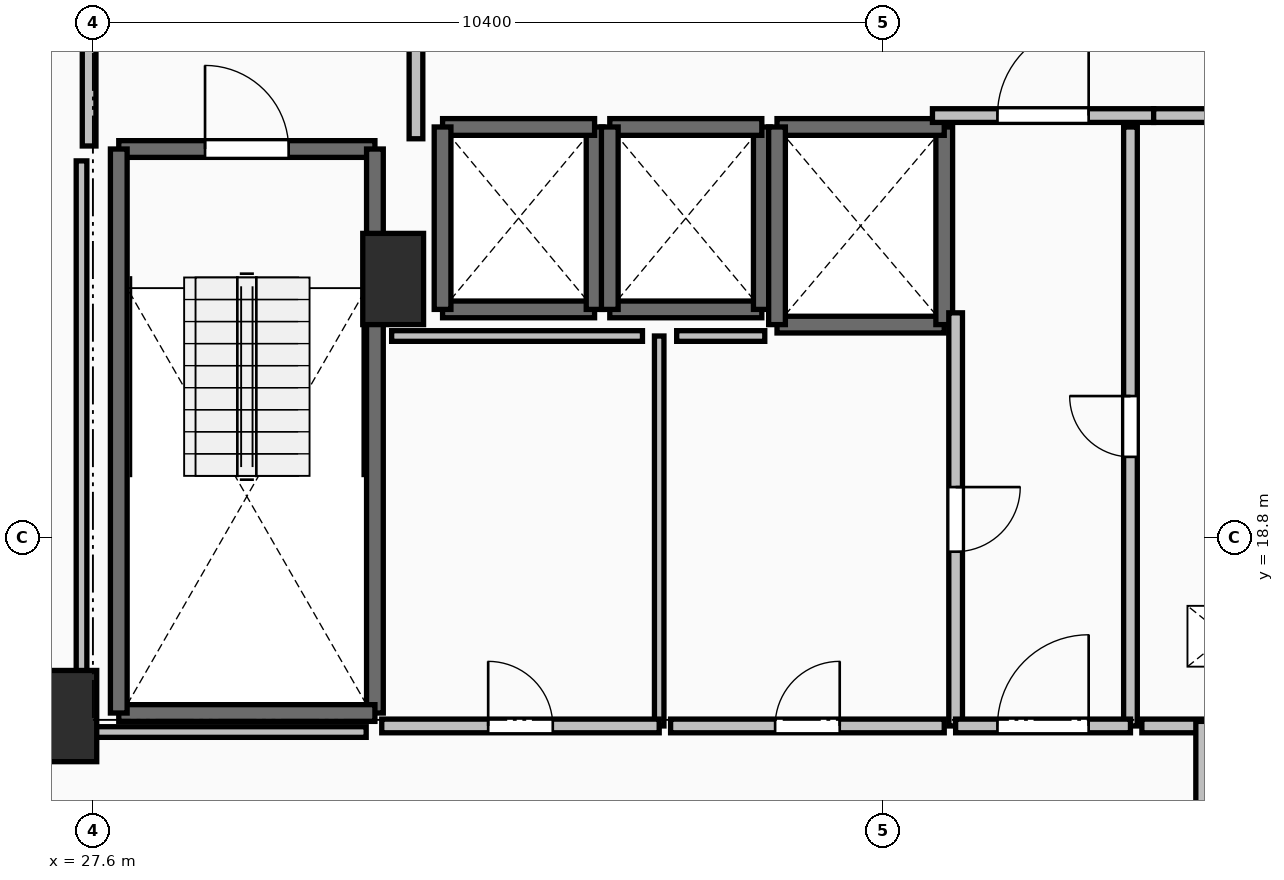
"""IFC4 building model, lengths in metres.
Left out: names, types, materials, properties, quantities, classifications, styles, units other than length and angle.
Written with IfcOpenShell. Run it as: python <this file> out.ifc"""

import sys

from ifc_helpers import new_model, si_unit, direction, frame, frame_2d, origin, origin_2d, place, context, subcontext, project, spatial, rectangle, extrude, element, fill, save


model = new_model("IFC4")
c1 = context("Model", 3, precision=1e-05, world=origin(), true_north=direction((0.0, 1.0)))
c2 = subcontext(c1, "Body", "Model", "MODEL_VIEW")
j1 = project(units=[si_unit("LENGTHUNIT", "METRE"), si_unit("PLANEANGLEUNIT", "RADIAN")], contexts=[c1])
p1 = place(None, origin())
s1 = spatial("IfcSite", under=j1, at=p1, CompositionType="ELEMENT")
p2 = place(p1, origin())
s2 = spatial("IfcBuilding", under=s1, at=p2, CompositionType="ELEMENT")
p3 = place(p2, frame((0.0, 0.0, 89.3)))
s3 = spatial("IfcBuildingStorey", under=s2, at=p3, CompositionType="ELEMENT", Elevation=89.3)
for number, where, z_axis, x_axis in (
    (1, (27.25, 16.45, 0.0), (0.0, 0.0, 1.0), (1.0, 0.0, 0.0)),
    (2, (31.55, 22.2, 0.0), (0.0, 0.0, 1.0), (1.0, 0.0, 0.0)),
):
    element("IfcColumn", number, at=place(p3, frame(where, z_axis=z_axis, x_axis=x_axis)), inside=s3, PredefinedType="PILASTER", context=c2, shape_type="SweptSolid", body=[
        extrude(rectangle(XDim=0.8, YDim=1.2, at=origin_2d()), origin(), (0.0, 0.0, 1.0), 3.5),
    ])
p4 = place(p3, frame((27.94, 23.91, 0.0), z_axis=(0.0, 0.0, 1.0), x_axis=(1.0, 0.0, 0.0)))
e3 = element("IfcWall", 3, at=p4, inside=s3, PredefinedType="SOLIDWALL", context=c2, shape_type="SweptSolid", body=[
    extrude(rectangle(XDim=3.37, YDim=0.22, at=frame_2d((1.685, 0.0))), origin(), (0.0, 0.0, 1.0), 3.24),
])
p5 = place(p4, frame((1.135, 0.0, 0.0)))
e4 = element("IfcOpeningElement", 4, at=p5, cuts=e3, PredefinedType="OPENING", context=c2, shape_type="SweptSolid", body=[
    extrude(rectangle(XDim=1.1, YDim=2.15, at=frame_2d((0.55, 1.075))), frame((0.0, 0.125, 0.0), z_axis=(0.0, -1.0, 0.0), x_axis=(1.0, 0.0, 0.0)), (0.0, 0.0, 1.0), 0.25),
])
p6 = place(p3, frame((31.31, 23.91, 0.0), z_axis=(0.0, 0.0, 1.0), x_axis=(0.0, -1.0, 0.0)))
e5 = element("IfcWall", 5, at=p6, inside=s3, PredefinedType="SOLIDWALL", context=c2, shape_type="SweptSolid", body=[
    extrude(rectangle(XDim=7.42, YDim=0.22, at=frame_2d((3.71, 0.0))), origin(), (0.0, 0.0, 1.0), 3.24),
])
p7 = place(p3, frame((31.31, 16.49, 0.0), z_axis=(0.0, 0.0, 1.0), x_axis=(-1.0, 0.0, 0.0)))
e6 = element("IfcWall", 6, at=p7, inside=s3, PredefinedType="SOLIDWALL", context=c2, shape_type="SweptSolid", body=[
    extrude(rectangle(XDim=3.37, YDim=0.22, at=frame_2d((1.685, 0.0))), origin(), (0.0, 0.0, 1.0), 3.24),
])
p8 = place(p3, frame((27.94, 16.49, 0.0), z_axis=(0.0, 0.0, 1.0), x_axis=(0.0, 1.0, 0.0)))
e7 = element("IfcWall", 7, at=p8, inside=s3, PredefinedType="SOLIDWALL", context=c2, shape_type="SweptSolid", body=[
    extrude(rectangle(XDim=7.42, YDim=0.22, at=frame_2d((3.71, 0.0))), origin(), (0.0, 0.0, 1.0), 3.24),
])
p9 = place(p3, frame((32.2, 21.8, 0.0), z_axis=(0.0, 0.0, 1.0), x_axis=(1.0, 0.0, 0.0)))
e8 = element("IfcWall", 8, at=p9, inside=s3, PredefinedType="SOLIDWALL", context=c2, shape_type="SweptSolid", body=[
    extrude(rectangle(XDim=2.0, YDim=0.22, at=frame_2d((1.0, 0.0))), origin(), (0.0, 0.0, 1.0), 3.24),
])
p10 = place(p3, frame((34.2, 21.8, 0.0), z_axis=(0.0, 0.0, 1.0), x_axis=(0.0, 1.0, 0.0)))
e9 = element("IfcWall", 9, at=p10, inside=s3, PredefinedType="SOLIDWALL", context=c2, shape_type="SweptSolid", body=[
    extrude(rectangle(XDim=2.4, YDim=0.22, at=frame_2d((1.2, 0.0))), origin(), (0.0, 0.0, 1.0), 3.24),
])
p11 = place(p3, frame((34.2, 24.2, 0.0), z_axis=(0.0, 0.0, 1.0), x_axis=(-1.0, 0.0, 0.0)))
e10 = element("IfcWall", 10, at=p11, inside=s3, PredefinedType="SOLIDWALL", context=c2, shape_type="SweptSolid", body=[
    extrude(rectangle(XDim=2.0, YDim=0.22, at=frame_2d((1.0, 0.0))), origin(), (0.0, 0.0, 1.0), 3.24),
])
p12 = place(p3, frame((32.2, 24.2, 0.0), z_axis=(0.0, 0.0, 1.0), x_axis=(0.0, -1.0, 0.0)))
e11 = element("IfcWall", 11, at=p12, inside=s3, PredefinedType="SOLIDWALL", context=c2, shape_type="SweptSolid", body=[
    extrude(rectangle(XDim=2.4, YDim=0.22, at=frame_2d((1.2, 0.0))), origin(), (0.0, 0.0, 1.0), 3.24),
])
p13 = place(p3, frame((34.4, 21.8, 0.0), z_axis=(0.0, 0.0, 1.0), x_axis=(1.0, 0.0, 0.0)))
e12 = element("IfcWall", 12, at=p13, inside=s3, PredefinedType="SOLIDWALL", context=c2, shape_type="SweptSolid", body=[
    extrude(rectangle(XDim=2.0, YDim=0.22, at=frame_2d((1.0, 0.0))), origin(), (0.0, 0.0, 1.0), 3.24),
])
p14 = place(p3, frame((36.4, 21.8, 0.0), z_axis=(0.0, 0.0, 1.0), x_axis=(0.0, 1.0, 0.0)))
e13 = element("IfcWall", 13, at=p14, inside=s3, PredefinedType="SOLIDWALL", context=c2, shape_type="SweptSolid", body=[
    extrude(rectangle(XDim=2.4, YDim=0.22, at=frame_2d((1.2, 0.0))), origin(), (0.0, 0.0, 1.0), 3.24),
])
p15 = place(p3, frame((36.4, 24.2, 0.0), z_axis=(0.0, 0.0, 1.0), x_axis=(-1.0, 0.0, 0.0)))
e14 = element("IfcWall", 14, at=p15, inside=s3, PredefinedType="SOLIDWALL", context=c2, shape_type="SweptSolid", body=[
    extrude(rectangle(XDim=2.0, YDim=0.22, at=frame_2d((1.0, 0.0))), origin(), (0.0, 0.0, 1.0), 3.24),
])
p16 = place(p3, frame((34.4, 24.2, 0.0), z_axis=(0.0, 0.0, 1.0), x_axis=(0.0, -1.0, 0.0)))
e15 = element("IfcWall", 15, at=p16, inside=s3, PredefinedType="SOLIDWALL", context=c2, shape_type="SweptSolid", body=[
    extrude(rectangle(XDim=2.4, YDim=0.22, at=frame_2d((1.2, 0.0))), origin(), (0.0, 0.0, 1.0), 3.24),
])
p17 = place(p3, frame((36.6, 21.6, 0.0), z_axis=(0.0, 0.0, 1.0), x_axis=(1.0, 0.0, 0.0)))
e16 = element("IfcWall", 16, at=p17, inside=s3, PredefinedType="SOLIDWALL", context=c2, shape_type="SweptSolid", body=[
    extrude(rectangle(XDim=2.2, YDim=0.22, at=frame_2d((1.1, 0.0))), origin(), (0.0, 0.0, 1.0), 3.24),
])
p18 = place(p3, frame((38.8, 21.6, 0.0), z_axis=(0.0, 0.0, 1.0), x_axis=(0.0, 1.0, 0.0)))
e17 = element("IfcWall", 17, at=p18, inside=s3, PredefinedType="SOLIDWALL", context=c2, shape_type="SweptSolid", body=[
    extrude(rectangle(XDim=2.6, YDim=0.22, at=frame_2d((1.3, 0.0))), origin(), (0.0, 0.0, 1.0), 3.24),
])
p19 = place(p3, frame((38.8, 24.2, 0.0), z_axis=(0.0, 0.0, 1.0), x_axis=(-1.0, 0.0, 0.0)))
e18 = element("IfcWall", 18, at=p19, inside=s3, PredefinedType="SOLIDWALL", context=c2, shape_type="SweptSolid", body=[
    extrude(rectangle(XDim=2.2, YDim=0.22, at=frame_2d((1.1, 0.0))), origin(), (0.0, 0.0, 1.0), 3.24),
])
p20 = place(p3, frame((36.6, 24.2, 0.0), z_axis=(0.0, 0.0, 1.0), x_axis=(0.0, -1.0, 0.0)))
e19 = element("IfcWall", 19, at=p20, inside=s3, PredefinedType="SOLIDWALL", context=c2, shape_type="SweptSolid", body=[
    extrude(rectangle(XDim=2.6, YDim=0.22, at=frame_2d((1.3, 0.0))), origin(), (0.0, 0.0, 1.0), 3.24),
])
p21 = place(p3, frame((31.85, 24.045, 0.0), z_axis=(0.0, 0.0, 1.0), x_axis=(0.0, 1.0, 0.0)))
e20 = element("IfcWall", 20, at=p21, inside=s3, PredefinedType="PARTITIONING", context=c2, shape_type="SweptSolid", body=[
    extrude(rectangle(XDim=3.91, YDim=0.18, at=frame_2d((1.955, 0.0))), origin(), (0.0, 0.0, 1.0), 3.24),
])
p22 = place(p21, frame((1.355, 0.0, 0.0)))
e21 = element("IfcOpeningElement", 21, at=p22, cuts=e20, PredefinedType="OPENING", context=c2, shape_type="SweptSolid", body=[
    extrude(rectangle(XDim=1.2, YDim=2.15, at=frame_2d((0.6, 1.075))), frame((0.0, 0.105, 0.0), z_axis=(0.0, -1.0, 0.0), x_axis=(1.0, 0.0, 0.0)), (0.0, 0.0, 1.0), 0.21),
])
p23 = place(p3, frame((27.55, 28.0, 0.0), z_axis=(0.0, 0.0, 1.0), x_axis=(0.0, -1.0, 0.0)))
e22 = element("IfcWall", 22, at=p23, inside=s3, PredefinedType="PARTITIONING", context=c2, shape_type="SweptSolid", body=[
    extrude(rectangle(XDim=4.05, YDim=0.18, at=frame_2d((2.025, 0.0))), origin(), (0.0, 0.0, 1.0), 3.24),
])
p24 = place(p23, frame((1.425, 0.0, 0.0)))
e23 = element("IfcOpeningElement", 23, at=p24, cuts=e22, PredefinedType="OPENING", context=c2, shape_type="SweptSolid", body=[
    extrude(rectangle(XDim=1.2, YDim=2.15, at=frame_2d((0.6, 1.075))), frame((0.0, 0.105, 0.0), z_axis=(0.0, -1.0, 0.0), x_axis=(1.0, 0.0, 0.0)), (0.0, 0.0, 1.0), 0.21),
])
p25 = place(p3, frame((38.645, 24.35, 0.0), z_axis=(0.0, 0.0, 1.0), x_axis=(1.0, 0.0, 0.0)))
e24 = element("IfcWall", 24, at=p25, inside=s3, PredefinedType="PARTITIONING", context=c2, shape_type="SweptSolid", body=[
    extrude(rectangle(XDim=2.91, YDim=0.18, at=frame_2d((1.455, 0.0))), origin(), (0.0, 0.0, 1.0), 3.24),
])
p26 = place(p25, frame((0.855, 0.0, 0.0)))
e25 = element("IfcOpeningElement", 25, at=p26, cuts=e24, PredefinedType="OPENING", context=c2, shape_type="SweptSolid", body=[
    extrude(rectangle(XDim=1.2, YDim=2.15, at=frame_2d((0.6, 1.075))), frame((0.0, 0.105, 0.0), z_axis=(0.0, -1.0, 0.0), x_axis=(1.0, 0.0, 0.0)), (0.0, 0.0, 1.0), 0.21),
])
p27 = place(p3, frame((41.555, 24.35, 0.0), z_axis=(0.0, 0.0, 1.0), x_axis=(1.0, 0.0, 0.0)))
e26 = element("IfcWall", 26, at=p27, inside=s3, PredefinedType="PARTITIONING", context=c2, shape_type="SweptSolid", body=[
    extrude(rectangle(XDim=2.445, YDim=0.18, at=frame_2d((1.223, 0.0))), origin(), (0.0, 0.0, 1.0), 3.24),
])
p28 = place(p27, frame((0.823, 0.0, 0.0)))
e27 = element("IfcOpeningElement", 27, at=p28, cuts=e26, PredefinedType="OPENING", context=c2, shape_type="SweptSolid", body=[
    extrude(rectangle(XDim=0.8, YDim=2.05, at=frame_2d((0.4, 1.025))), frame((0.0, 0.105, 0.0), z_axis=(0.0, -1.0, 0.0), x_axis=(1.0, 0.0, 0.0)), (0.0, 0.0, 1.0), 0.21),
])
p29 = place(p3, frame((41.25, 16.32, 0.0), z_axis=(0.0, 0.0, 1.0), x_axis=(0.0, 1.0, 0.0)))
e28 = element("IfcWall", 28, at=p29, inside=s3, PredefinedType="PARTITIONING", context=c2, shape_type="SweptSolid", body=[
    extrude(rectangle(XDim=7.88, YDim=0.18, at=frame_2d((3.94, 0.0))), origin(), (0.0, 0.0, 1.0), 3.24),
])
p30 = place(p29, frame((3.54, 0.0, 0.0)))
e29 = element("IfcOpeningElement", 29, at=p30, cuts=e28, PredefinedType="OPENING", context=c2, shape_type="SweptSolid", body=[
    extrude(rectangle(XDim=0.8, YDim=2.05, at=frame_2d((0.4, 1.025))), frame((0.0, 0.105, 0.0), z_axis=(0.0, -1.0, 0.0), x_axis=(1.0, 0.0, 0.0)), (0.0, 0.0, 1.0), 0.21),
])
p31 = place(p3, frame((38.95, 21.755, 0.0), z_axis=(0.0, 0.0, 1.0), x_axis=(0.0, -1.0, 0.0)))
e30 = element("IfcWall", 30, at=p31, inside=s3, PredefinedType="PARTITIONING", context=c2, shape_type="SweptSolid", body=[
    extrude(rectangle(XDim=5.435, YDim=0.18, at=frame_2d((2.717, 0.0))), origin(), (0.0, 0.0, 1.0), 3.24),
])
p32 = place(p31, frame((2.292, 0.0, 0.0)))
e31 = element("IfcOpeningElement", 31, at=p32, cuts=e30, PredefinedType="OPENING", context=c2, shape_type="SweptSolid", body=[
    extrude(rectangle(XDim=0.85, YDim=2.1, at=frame_2d((0.425, 1.05))), frame((0.0, 0.105, 0.0), z_axis=(0.0, -1.0, 0.0), x_axis=(1.0, 0.0, 0.0)), (0.0, 0.0, 1.0), 0.21),
])
p33 = place(p3, frame((38.95, 16.32, 0.0), z_axis=(0.0, 0.0, 1.0), x_axis=(1.0, 0.0, 0.0)))
e32 = element("IfcWall", 32, at=p33, inside=s3, PredefinedType="PARTITIONING", context=c2, shape_type="SweptSolid", body=[
    extrude(rectangle(XDim=2.3, YDim=0.18, at=frame_2d((1.15, 0.0))), origin(), (0.0, 0.0, 1.0), 3.24),
])
p34 = place(p33, frame((0.55, 0.0, 0.0)))
e33 = element("IfcOpeningElement", 33, at=p34, cuts=e32, PredefinedType="OPENING", context=c2, shape_type="SweptSolid", body=[
    extrude(rectangle(XDim=1.2, YDim=2.15, at=frame_2d((0.6, 1.075))), frame((0.0, 0.105, 0.0), z_axis=(0.0, -1.0, 0.0), x_axis=(1.0, 0.0, 0.0)), (0.0, 0.0, 1.0), 0.21),
])
p35 = place(p3, frame((41.4, 16.32, 0.0), z_axis=(0.0, 0.0, 1.0), x_axis=(1.0, 0.0, 0.0)))
e34 = element("IfcWall", 34, at=p35, inside=s3, PredefinedType="PARTITIONING", context=c2, shape_type="SweptSolid", body=[
    extrude(rectangle(XDim=3.2, YDim=0.18, at=frame_2d((1.6, 0.0))), origin(), (0.0, 0.0, 1.0), 3.24),
])
p36 = place(p35, frame((1.2, 0.0, 0.0)))
e35 = element("IfcOpeningElement", 35, at=p36, cuts=e34, PredefinedType="OPENING", context=c2, shape_type="SweptSolid", body=[
    extrude(rectangle(XDim=0.8, YDim=2.05, at=frame_2d((0.4, 1.025))), frame((0.0, 0.105, 0.0), z_axis=(0.0, -1.0, 0.0), x_axis=(1.0, 0.0, 0.0)), (0.0, 0.0, 1.0), 0.21),
])
p37 = place(p3, frame((35.05, 16.32, 0.0), z_axis=(0.0, 0.0, 1.0), x_axis=(0.0, 1.0, 0.0)))
e36 = element("IfcWall", 36, at=p37, inside=s3, PredefinedType="PARTITIONING", context=c2, shape_type="SweptSolid", body=[
    extrude(rectangle(XDim=5.13, YDim=0.125, at=frame_2d((2.565, 0.0))), origin(), (0.0, 0.0, 1.0), 3.24),
])
p38 = place(p3, frame((31.4, 16.32, 0.0), z_axis=(0.0, 0.0, 1.0), x_axis=(1.0, 0.0, 0.0)))
e37 = element("IfcWall", 37, at=p38, inside=s3, PredefinedType="PARTITIONING", context=c2, shape_type="SweptSolid", body=[
    extrude(rectangle(XDim=3.65, YDim=0.18, at=frame_2d((1.825, 0.0))), origin(), (0.0, 0.0, 1.0), 3.24),
])
p39 = place(p38, frame((1.4, 0.0, 0.0)))
e38 = element("IfcOpeningElement", 38, at=p39, cuts=e37, PredefinedType="OPENING", context=c2, shape_type="SweptSolid", body=[
    extrude(rectangle(XDim=0.85, YDim=2.1, at=frame_2d((0.425, 1.05))), frame((0.0, 0.105, 0.0), z_axis=(0.0, -1.0, 0.0), x_axis=(1.0, 0.0, 0.0)), (0.0, 0.0, 1.0), 0.21),
])
p40 = place(p3, frame((35.2, 16.32, 0.0), z_axis=(0.0, 0.0, 1.0), x_axis=(1.0, 0.0, 0.0)))
e39 = element("IfcWall", 39, at=p40, inside=s3, PredefinedType="PARTITIONING", context=c2, shape_type="SweptSolid", body=[
    extrude(rectangle(XDim=3.6, YDim=0.18, at=frame_2d((1.8, 0.0))), origin(), (0.0, 0.0, 1.0), 3.24),
])
p41 = place(p40, frame((1.375, 0.0, 0.0)))
e40 = element("IfcOpeningElement", 40, at=p41, cuts=e39, PredefinedType="OPENING", context=c2, shape_type="SweptSolid", body=[
    extrude(rectangle(XDim=0.85, YDim=2.1, at=frame_2d((0.425, 1.05))), frame((0.0, 0.105, 0.0), z_axis=(0.0, -1.0, 0.0), x_axis=(1.0, 0.0, 0.0)), (0.0, 0.0, 1.0), 0.21),
])
p42 = place(p3, frame((42.2, 13.96, 0.0), z_axis=(0.0, 0.0, 1.0), x_axis=(0.0, 1.0, 0.0)))
e41 = element("IfcWall", 41, at=p42, inside=s3, PredefinedType="PARTITIONING", context=c2, shape_type="SweptSolid", body=[
    extrude(rectangle(XDim=2.42, YDim=0.18, at=frame_2d((1.21, 0.0))), origin(), (0.0, 0.0, 1.0), 2.972),
])
p43 = place(p3, frame((34.83, 21.45, 0.0), z_axis=(0.0, 0.0, 1.0), x_axis=(-1.0, 0.0, 0.0)))
e42 = element("IfcWall", 42, at=p43, inside=s3, PredefinedType="PARTITIONING", context=c2, shape_type="SweptSolid", body=[
    extrude(rectangle(XDim=3.3, YDim=0.14, at=frame_2d((1.65, 0.0))), origin(), (0.0, 0.0, 1.0), 3.24),
])
p44 = place(p3, frame((36.439, 21.45, 0.0), z_axis=(0.0, 0.0, 1.0), x_axis=(-1.0, 0.0, 0.0)))
e43 = element("IfcWall", 43, at=p44, inside=s3, PredefinedType="PARTITIONING", context=c2, shape_type="SweptSolid", body=[
    extrude(rectangle(XDim=1.159, YDim=0.14, at=frame_2d((0.58, 0.0))), origin(), (0.0, 0.0, 1.0), 3.24),
])
p45 = place(p3, frame((31.195, 16.24, 0.0), z_axis=(0.0, 0.0, 1.0), x_axis=(-1.0, 0.0, 0.0)))
e44 = element("IfcWall", 44, at=p45, inside=s3, PredefinedType="PARTITIONING", context=c2, shape_type="SweptSolid", body=[
    extrude(rectangle(XDim=3.745, YDim=0.14, at=frame_2d((1.873, 0.0))), origin(), (0.0, 0.0, 1.0), 2.432),
])
p46 = place(p3, frame((27.45, 16.24, 0.0), z_axis=(0.0, 0.0, 1.0), x_axis=(0.0, 1.0, 0.0)))
e45 = element("IfcWall", 45, at=p46, inside=s3, PredefinedType="PARTITIONING", context=c2, shape_type="SweptSolid", body=[
    extrude(rectangle(XDim=7.514, YDim=0.14, at=frame_2d((3.757, 0.0))), origin(), (0.0, 0.0, 1.0), 2.432),
])
p47 = place(p5, origin())
e46 = element("IfcDoor", 46, at=p47, inside=s3, OperationType="SINGLE_SWING_LEFT", PredefinedType="DOOR", context=c2, shape_type="SweptSolid", body=[
    extrude(rectangle(XDim=1.1, YDim=2.15, at=frame_2d((0.55, 1.075))), frame((0.0, 0.025, 0.0), z_axis=(0.0, -1.0, 0.0), x_axis=(1.0, 0.0, 0.0)), (0.0, 0.0, 1.0), 0.05),
])
fill(e4, e46)
p48 = place(p26, origin())
e47 = element("IfcDoor", 47, at=p48, inside=s3, OperationType="SINGLE_SWING_RIGHT", PredefinedType="DOOR", context=c2, shape_type="SweptSolid", body=[
    extrude(rectangle(XDim=1.2, YDim=2.15, at=frame_2d((0.6, 1.075))), frame((0.0, 0.025, 0.0), z_axis=(0.0, -1.0, 0.0), x_axis=(1.0, 0.0, 0.0)), (0.0, 0.0, 1.0), 0.05),
])
fill(e25, e47)
p49 = place(p30, origin())
e48 = element("IfcDoor", 48, at=p49, inside=s3, OperationType="SINGLE_SWING_RIGHT", PredefinedType="DOOR", context=c2, shape_type="SweptSolid", body=[
    extrude(rectangle(XDim=0.8, YDim=2.05, at=frame_2d((0.4, 1.025))), frame((0.0, 0.025, 0.0), z_axis=(0.0, -1.0, 0.0), x_axis=(1.0, 0.0, 0.0)), (0.0, 0.0, 1.0), 0.05),
])
fill(e29, e48)
p50 = place(p32, origin())
e49 = element("IfcDoor", 49, at=p50, inside=s3, OperationType="SINGLE_SWING_LEFT", PredefinedType="DOOR", context=c2, shape_type="SweptSolid", body=[
    extrude(rectangle(XDim=0.85, YDim=2.1, at=frame_2d((0.425, 1.05))), frame((0.0, 0.025, 0.0), z_axis=(0.0, -1.0, 0.0), x_axis=(1.0, 0.0, 0.0)), (0.0, 0.0, 1.0), 0.05),
])
fill(e31, e49)
p51 = place(p34, origin())
e50 = element("IfcDoor", 50, at=p51, inside=s3, OperationType="SINGLE_SWING_RIGHT", PredefinedType="DOOR", context=c2, shape_type="SweptSolid", body=[
    extrude(rectangle(XDim=1.2, YDim=2.15, at=frame_2d((0.6, 1.075))), frame((0.0, 0.025, 0.0), z_axis=(0.0, -1.0, 0.0), x_axis=(1.0, 0.0, 0.0)), (0.0, 0.0, 1.0), 0.05),
])
fill(e33, e50)
p52 = place(p39, origin())
e51 = element("IfcDoor", 51, at=p52, inside=s3, OperationType="SINGLE_SWING_LEFT", PredefinedType="DOOR", context=c2, shape_type="SweptSolid", body=[
    extrude(rectangle(XDim=0.85, YDim=2.1, at=frame_2d((0.425, 1.05))), frame((0.0, 0.025, 0.0), z_axis=(0.0, -1.0, 0.0), x_axis=(1.0, 0.0, 0.0)), (0.0, 0.0, 1.0), 0.05),
])
fill(e38, e51)
p53 = place(p41, origin())
e52 = element("IfcDoor", 52, at=p53, inside=s3, OperationType="SINGLE_SWING_RIGHT", PredefinedType="DOOR", context=c2, shape_type="SweptSolid", body=[
    extrude(rectangle(XDim=0.85, YDim=2.1, at=frame_2d((0.425, 1.05))), frame((0.0, 0.025, 0.0), z_axis=(0.0, -1.0, 0.0), x_axis=(1.0, 0.0, 0.0)), (0.0, 0.0, 1.0), 0.05),
])
fill(e40, e52)
save(model, sys.argv[1])
